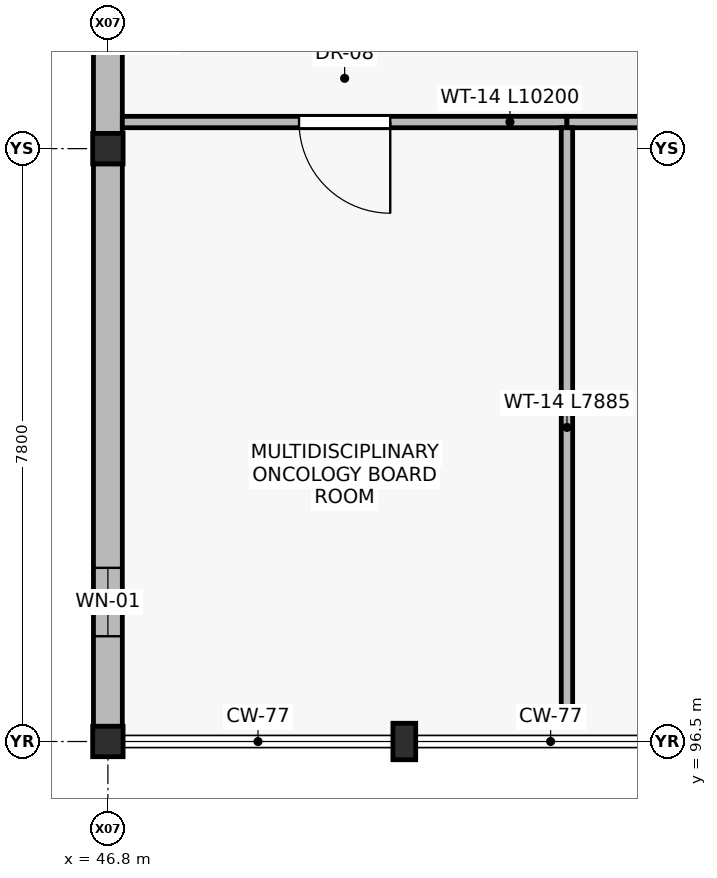
"""IFC4 building model, lengths in metres.
Left out: names, types, materials, properties, quantities, classifications, styles, units other than length and angle.
Written with IfcOpenShell. Run it as: python <this file> out.ifc"""

import sys

from ifc_helpers import new_model, si_unit, direction, frame, frame_2d, origin, origin_2d, place, context, subcontext, project, spatial, rectangle, extrude, element, fill, save


model = new_model("IFC4")
c1 = context("Model", 3, precision=1e-05, world=origin(), true_north=direction((0.0, 1.0)))
c2 = subcontext(c1, "Body", "Model", "MODEL_VIEW")
j1 = project(units=[si_unit("LENGTHUNIT", "METRE"), si_unit("PLANEANGLEUNIT", "RADIAN")], contexts=[c1])
p1 = place(None, origin())
s1 = spatial("IfcSite", under=j1, at=p1, CompositionType="ELEMENT")
p2 = place(p1, origin())
s2 = spatial("IfcBuilding", under=s1, at=p2, CompositionType="ELEMENT")
p3 = place(p2, frame((0.0, 0.0, 23.1)))
s3 = spatial("IfcBuildingStorey", under=s2, at=p3, CompositionType="ELEMENT", Elevation=23.1)
for number, where, z_axis, x_axis in (
    (1, (46.8, 96.5, 0.0), (0.0, 0.0, 1.0), (1.0, 0.0, 0.0)),
    (2, (46.8, 104.3, 0.0), (0.0, 0.0, 1.0), (1.0, 0.0, 0.0)),
):
    element("IfcColumn", number, at=place(p3, frame(where, z_axis=z_axis, x_axis=x_axis)), inside=s3, PredefinedType="COLUMN", context=c2, shape_type="SweptSolid", body=[
        extrude(rectangle(XDim=0.4, YDim=0.4, at=origin_2d()), origin(), (0.0, 0.0, 1.0), 4.2),
    ])
p4 = place(p3, frame((50.7, 96.5, 0.0), z_axis=(0.0, 0.0, 1.0), x_axis=(1.0, 0.0, 0.0)))
e3 = element("IfcColumn", 3, at=p4, inside=s3, PredefinedType="PILASTER", context=c2, shape_type="SweptSolid", body=[
    extrude(rectangle(XDim=0.3, YDim=0.48, at=origin_2d()), origin(), (0.0, 0.0, 1.0), 4.2),
])
p5 = place(p3, frame((46.8, 96.7, 0.0), z_axis=(0.0, 0.0, 1.0), x_axis=(0.0, 1.0, 0.0)))
e4 = element("IfcWall", 4, at=p5, inside=s3, PredefinedType="STANDARD", context=c2, shape_type="SweptSolid", body=[
    extrude(rectangle(XDim=7.4, YDim=0.38, at=frame_2d((3.7, 0.0))), origin(), (0.0, 0.0, 1.0), 3.65),
])
p6 = place(p5, frame((1.185, 0.0, 0.9)))
e5 = element("IfcOpeningElement", 5, at=p6, cuts=e4, PredefinedType="OPENING", context=c2, shape_type="SweptSolid", body=[
    extrude(rectangle(XDim=0.9, YDim=1.6, at=frame_2d((0.45, 0.8))), frame((0.0, 0.2, 0.0), z_axis=(0.0, -1.0, 0.0), x_axis=(1.0, 0.0, 0.0)), (0.0, 0.0, 1.0), 0.4),
])
p7 = place(p3, frame((46.8, 104.5, 0.0), z_axis=(0.0, 0.0, 1.0), x_axis=(0.0, 1.0, 0.0)))
e6 = element("IfcWall", 6, at=p7, inside=s3, PredefinedType="STANDARD", context=c2, shape_type="SweptSolid", body=[
    extrude(rectangle(XDim=3.5, YDim=0.38, at=frame_2d((1.75, 0.0))), origin(), (0.0, 0.0, 1.0), 3.65),
])
p8 = place(p7, frame((1.15, 0.0, 0.9)))
e7 = element("IfcOpeningElement", 7, at=p8, cuts=e6, PredefinedType="OPENING", context=c2, shape_type="SweptSolid", body=[
    extrude(rectangle(XDim=1.2, YDim=1.5, at=frame_2d((0.6, 0.75))), frame((0.0, 0.2, 0.0), z_axis=(0.0, -1.0, 0.0), x_axis=(1.0, 0.0, 0.0)), (0.0, 0.0, 1.0), 0.4),
])
p9 = place(p3, frame((52.84, 104.65, 0.0), z_axis=(0.0, 0.0, 1.0), x_axis=(-1.0, 0.0, 0.0)))
e8 = element("IfcWall", 8, at=p9, inside=s3, PredefinedType="PARTITIONING", context=c2, shape_type="SweptSolid", body=[
    extrude(rectangle(XDim=5.85, YDim=0.15, at=frame_2d((2.925, 0.0))), origin(), (0.0, 0.0, 1.0), 3.94),
])
p10 = place(p9, frame((2.325, 0.0, 0.0)))
e9 = element("IfcOpeningElement", 9, at=p10, cuts=e8, PredefinedType="OPENING", context=c2, shape_type="SweptSolid", body=[
    extrude(rectangle(XDim=1.2, YDim=2.2, at=frame_2d((0.6, 1.1))), frame((0.0, 0.085, 0.0), z_axis=(0.0, -1.0, 0.0), x_axis=(1.0, 0.0, 0.0)), (0.0, 0.0, 1.0), 0.17),
])
p11 = place(p3, frame((57.19, 104.65, 0.0), z_axis=(0.0, 0.0, 1.0), x_axis=(-1.0, 0.0, 0.0)))
e10 = element("IfcWall", 10, at=p11, inside=s3, PredefinedType="PARTITIONING", context=c2, shape_type="SweptSolid", body=[
    extrude(rectangle(XDim=4.35, YDim=0.15, at=frame_2d((2.175, 0.0))), origin(), (0.0, 0.0, 1.0), 3.94),
])
p12 = place(p11, frame((0.438, 0.0, 0.0)))
e11 = element("IfcOpeningElement", 11, at=p12, cuts=e10, PredefinedType="OPENING", context=c2, shape_type="SweptSolid", body=[
    extrude(rectangle(XDim=1.3, YDim=2.2, at=frame_2d((0.65, 1.1))), frame((0.0, 0.085, 0.0), z_axis=(0.0, -1.0, 0.0), x_axis=(1.0, 0.0, 0.0)), (0.0, 0.0, 1.0), 0.17),
])
p13 = place(p3, frame((52.84, 96.69, 0.0), z_axis=(0.0, 0.0, 1.0), x_axis=(0.0, 1.0, 0.0)))
e12 = element("IfcWall", 12, at=p13, inside=s3, PredefinedType="PARTITIONING", context=c2, shape_type="SweptSolid", body=[
    extrude(rectangle(XDim=7.885, YDim=0.15, at=frame_2d((3.942, 0.0))), origin(), (0.0, 0.0, 1.0), 3.94),
])
p14 = place(p6, origin())
e13 = element("IfcWindow", 13, at=p14, inside=s3, PartitioningType="SINGLE_PANEL", PredefinedType="WINDOW", context=c2, shape_type="SweptSolid", body=[
    extrude(rectangle(XDim=0.9, YDim=1.6, at=frame_2d((0.45, 0.8))), frame((0.0, 0.03, 0.0), z_axis=(0.0, -1.0, 0.0), x_axis=(1.0, 0.0, 0.0)), (0.0, 0.0, 1.0), 0.06),
])
fill(e5, e13)
p15 = place(p10, origin())
e14 = element("IfcDoor", 14, at=p15, inside=s3, OperationType="SINGLE_SWING_LEFT", PredefinedType="DOOR", context=c2, shape_type="SweptSolid", body=[
    extrude(rectangle(XDim=1.2, YDim=2.2, at=frame_2d((0.6, 1.1))), frame((0.0, 0.025, 0.0), z_axis=(0.0, -1.0, 0.0), x_axis=(1.0, 0.0, 0.0)), (0.0, 0.0, 1.0), 0.05),
])
fill(e9, e14)
save(model, sys.argv[1])
